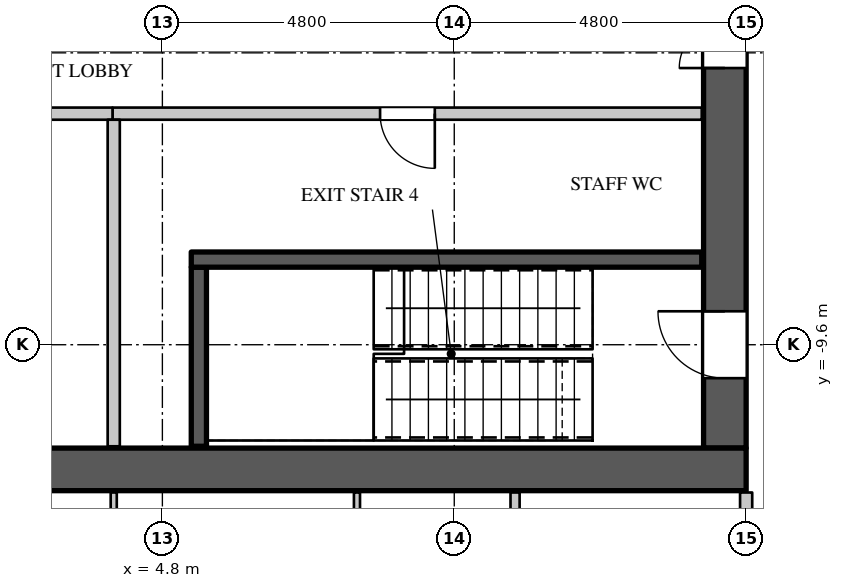
"""IFC4 building model, lengths in metres.
Left out: names, types, materials, properties, quantities, classifications, styles, units other than length and angle.
Written with IfcOpenShell. Run it as: python <this file> out.ifc"""

import sys

from ifc_helpers import new_model, si_unit, direction, frame, frame_2d, origin, place, context, subcontext, project, spatial, rectangle, extrude, element, fill, save


model = new_model("IFC4")
c1 = context("Model", 3, precision=1e-05, world=origin(), true_north=direction((0.0, 1.0)))
c2 = subcontext(c1, "Body", "Model", "MODEL_VIEW")
j1 = project(units=[si_unit("LENGTHUNIT", "METRE"), si_unit("PLANEANGLEUNIT", "RADIAN")], contexts=[c1])
p1 = place(None, origin())
s1 = spatial("IfcSite", under=j1, at=p1, CompositionType="ELEMENT")
p2 = place(p1, origin())
s2 = spatial("IfcBuilding", under=s1, at=p2, CompositionType="ELEMENT")
p3 = place(p2, frame((0.0, 0.0, 204.3)))
s3 = spatial("IfcBuildingStorey", under=s2, at=p3, CompositionType="ELEMENT", Elevation=204.3)
p4 = place(p3, frame((-14.4, -11.65, 0.0), z_axis=(0.0, 0.0, 1.0), x_axis=(1.0, 0.0, 0.0)))
e1 = element("IfcWall", 1, at=p4, inside=s3, PredefinedType="SHEAR", context=c2, shape_type="SweptSolid", body=[
    extrude(rectangle(XDim=28.8, YDim=0.7, at=frame_2d((14.4, 0.0))), origin(), (0.0, 0.0, 1.0), 4.2),
])
p5 = place(p3, frame((14.05, -11.3, 0.0), z_axis=(0.0, 0.0, 1.0), x_axis=(0.0, 1.0, 0.0)))
e2 = element("IfcWall", 2, at=p5, inside=s3, PredefinedType="SHEAR", context=c2, shape_type="SweptSolid", body=[
    extrude(rectangle(XDim=22.6, YDim=0.7, at=frame_2d((11.3, 0.0))), origin(), (0.0, 0.0, 1.0), 4.2),
])
p6 = place(p5, frame((20.35, 0.0, 0.0)))
e3 = element("IfcOpeningElement", 3, at=p6, cuts=e2, PredefinedType="OPENING", context=c2, shape_type="SweptSolid", body=[
    extrude(rectangle(XDim=1.1, YDim=2.2, at=frame_2d((0.55, 1.1))), frame((0.0, 0.36, 0.0), z_axis=(0.0, -1.0, 0.0), x_axis=(1.0, 0.0, 0.0)), (0.0, 0.0, 1.0), 0.72),
])
p7 = place(p5, frame((1.15, 0.0, 0.0)))
e4 = element("IfcOpeningElement", 4, at=p7, cuts=e2, PredefinedType="OPENING", context=c2, shape_type="SweptSolid", body=[
    extrude(rectangle(XDim=1.1, YDim=2.2, at=frame_2d((0.55, 1.1))), frame((0.0, 0.36, 0.0), z_axis=(0.0, -1.0, 0.0), x_axis=(1.0, 0.0, 0.0)), (0.0, 0.0, 1.0), 0.72),
])
p8 = place(p5, frame((14.85, 0.0, 0.0)))
e5 = element("IfcOpeningElement", 5, at=p8, cuts=e2, PredefinedType="OPENING", context=c2, shape_type="SweptSolid", body=[
    extrude(rectangle(XDim=1.5, YDim=2.4, at=frame_2d((0.75, 1.2))), frame((0.0, 0.36, 0.0), z_axis=(0.0, -1.0, 0.0), x_axis=(1.0, 0.0, 0.0)), (0.0, 0.0, 1.0), 0.72),
])
p9 = place(p5, frame((6.25, 0.0, 0.0)))
e6 = element("IfcOpeningElement", 6, at=p9, cuts=e2, PredefinedType="OPENING", context=c2, shape_type="SweptSolid", body=[
    extrude(rectangle(XDim=1.5, YDim=2.4, at=frame_2d((0.75, 1.2))), frame((0.0, 0.36, 0.0), z_axis=(0.0, -1.0, 0.0), x_axis=(1.0, 0.0, 0.0)), (0.0, 0.0, 1.0), 0.72),
])
p10 = place(p3, frame((3.98, -5.8, 0.0), z_axis=(0.0, 0.0, 1.0), x_axis=(1.0, 0.0, 0.0)))
e7 = element("IfcWall", 7, at=p10, inside=s3, PredefinedType="PARTITIONING", context=c2, shape_type="SweptSolid", body=[
    extrude(rectangle(XDim=9.69, YDim=0.2, at=frame_2d((4.845, 0.0))), origin(), (0.0, 0.0, 1.0), 3.798),
])
p11 = place(p10, frame((4.4, 0.0, 0.0)))
e8 = element("IfcOpeningElement", 8, at=p11, cuts=e7, PredefinedType="OPENING", context=c2, shape_type="SweptSolid", body=[
    extrude(rectangle(XDim=0.9, YDim=2.2, at=frame_2d((0.45, 1.1))), frame((0.0, 0.11, 0.0), z_axis=(0.0, -1.0, 0.0), x_axis=(1.0, 0.0, 0.0)), (0.0, 0.0, 1.0), 0.22),
])
p12 = place(p3, frame((14.4, -14.3, 0.0), z_axis=(0.0, 0.0, 1.0), x_axis=(0.0, 1.0, 0.0)))
e9 = element("IfcWall", 9, at=p12, inside=s3, PredefinedType="PARTITIONING", context=c2, shape_type="SweptSolid", body=[
    extrude(rectangle(XDim=2.27, YDim=0.2, at=frame_2d((1.135, 0.0))), origin(), (0.0, 0.0, 1.0), 3.798),
])
p13 = place(p12, frame((0.55, 0.0, 0.0)))
e10 = element("IfcOpeningElement", 10, at=p13, cuts=e9, PredefinedType="OPENING", context=c2, shape_type="SweptSolid", body=[
    extrude(rectangle(XDim=1.1, YDim=2.4, at=frame_2d((0.55, 1.2))), frame((0.0, 0.11, 0.0), z_axis=(0.0, -1.0, 0.0), x_axis=(1.0, 0.0, 0.0)), (0.0, 0.0, 1.0), 0.22),
])
p14 = place(p3, frame((10.6, -17.425, 0.0), z_axis=(0.0, 0.0, 1.0), x_axis=(0.0, 1.0, 0.0)))
e11 = element("IfcWall", 11, at=p14, inside=s3, PredefinedType="PARTITIONING", context=c2, shape_type="SweptSolid", body=[
    extrude(rectangle(XDim=5.395, YDim=0.15, at=frame_2d((2.698, 0.0))), origin(), (0.0, 0.0, 1.0), 3.798),
])
p15 = place(p14, frame((2.2, 0.0, 0.0)))
e12 = element("IfcOpeningElement", 12, at=p15, cuts=e11, PredefinedType="OPENING", context=c2, shape_type="SweptSolid", body=[
    extrude(rectangle(XDim=0.95, YDim=2.2, at=frame_2d((0.475, 1.1))), frame((0.0, 0.085, 0.0), z_axis=(0.0, -1.0, 0.0), x_axis=(1.0, 0.0, 0.0)), (0.0, 0.0, 1.0), 0.17),
])
p16 = place(p3, frame((-3.22, -5.8, 0.0), z_axis=(0.0, 0.0, 1.0), x_axis=(1.0, 0.0, 0.0)))
e13 = element("IfcWall", 13, at=p16, inside=s3, PredefinedType="PARTITIONING", context=c2, shape_type="SweptSolid", body=[
    extrude(rectangle(XDim=7.2, YDim=0.2, at=frame_2d((3.6, 0.0))), origin(), (0.0, 0.0, 1.0), 3.798),
])
p17 = place(p16, frame((3.15, 0.0, 0.0)))
e14 = element("IfcOpeningElement", 14, at=p17, cuts=e13, PredefinedType="OPENING", context=c2, shape_type="SweptSolid", body=[
    extrude(rectangle(XDim=0.9, YDim=2.2, at=frame_2d((0.45, 1.1))), frame((0.0, 0.11, 0.0), z_axis=(0.0, -1.0, 0.0), x_axis=(1.0, 0.0, 0.0)), (0.0, 0.0, 1.0), 0.22),
])
p18 = place(p3, frame((4.0, -11.27, 0.0), z_axis=(0.0, 0.0, 1.0), x_axis=(0.0, 1.0, 0.0)))
e15 = element("IfcWall", 15, at=p18, inside=s3, PredefinedType="PARTITIONING", context=c2, shape_type="SweptSolid", body=[
    extrude(rectangle(XDim=5.37, YDim=0.2, at=frame_2d((2.685, 0.0))), origin(), (0.0, 0.0, 1.0), 3.798),
])
p19 = place(p3, frame((5.4, -11.27, 0.0), z_axis=(0.0, 0.0, 1.0), x_axis=(0.0, 1.0, 0.0)))
e16 = element("IfcWall", 16, at=p19, inside=s3, PredefinedType="SHEAR", context=c2, shape_type="SweptSolid", body=[
    extrude(rectangle(XDim=2.945, YDim=0.25, at=frame_2d((1.473, 0.0))), origin(), (0.0, 0.0, 1.0), 3.798),
])
p20 = place(p3, frame((5.275, -8.2, 0.0), z_axis=(0.0, 0.0, 1.0), x_axis=(1.0, 0.0, 0.0)))
e17 = element("IfcWall", 17, at=p20, inside=s3, PredefinedType="SHEAR", context=c2, shape_type="SweptSolid", body=[
    extrude(rectangle(XDim=8.395, YDim=0.25, at=frame_2d((4.198, 0.0))), origin(), (0.0, 0.0, 1.0), 3.798),
])
p21 = place(p3, frame((4.0, -16.95, 0.0), z_axis=(0.0, 0.0, 1.0), x_axis=(0.0, 1.0, 0.0)))
e18 = element("IfcWall", 18, at=p21, inside=s3, PredefinedType="PARTITIONING", context=c2, shape_type="SweptSolid", body=[
    extrude(rectangle(XDim=4.92, YDim=0.1, at=frame_2d((2.46, 0.0))), origin(), (0.0, 0.0, 1.0), 3.2),
])
p22 = place(p3, frame((8.0, -16.925, 0.0), z_axis=(0.0, 0.0, 1.0), x_axis=(0.0, 1.0, 0.0)))
e19 = element("IfcWall", 19, at=p22, inside=s3, PredefinedType="PARTITIONING", context=c2, shape_type="SweptSolid", body=[
    extrude(rectangle(XDim=4.895, YDim=0.1, at=frame_2d((2.448, 0.0))), origin(), (0.0, 0.0, 1.0), 3.798),
])
p23 = place(p11, origin())
e20 = element("IfcDoor", 20, at=p23, inside=s3, OperationType="SINGLE_SWING_LEFT", PredefinedType="DOOR", context=c2, shape_type="SweptSolid", body=[
    extrude(rectangle(XDim=0.9, YDim=2.2, at=frame_2d((0.45, 1.1))), frame((0.0, 0.025, 0.0), z_axis=(0.0, -1.0, 0.0), x_axis=(1.0, 0.0, 0.0)), (0.0, 0.0, 1.0), 0.05),
])
fill(e8, e20)
p24 = place(p7, origin())
e21 = element("IfcDoor", 21, at=p24, inside=s3, OperationType="SINGLE_SWING_RIGHT", PredefinedType="DOOR", context=c2, shape_type="SweptSolid", body=[
    extrude(rectangle(XDim=1.1, YDim=2.2, at=frame_2d((0.55, 1.1))), frame((0.0, 0.345, 0.0), z_axis=(0.0, -1.0, 0.0), x_axis=(1.0, 0.0, 0.0)), (0.0, 0.0, 1.0), 0.05),
])
fill(e4, e21)
p25 = place(p9, origin())
e22 = element("IfcDoor", 22, at=p25, inside=s3, OperationType="DOUBLE_DOOR_SINGLE_SWING", PredefinedType="DOOR", context=c2, shape_type="SweptSolid", body=[
    extrude(rectangle(XDim=1.5, YDim=2.4, at=frame_2d((0.75, 1.2))), frame((0.0, 0.345, 0.0), z_axis=(0.0, -1.0, 0.0), x_axis=(1.0, 0.0, 0.0)), (0.0, 0.0, 1.0), 0.05),
])
fill(e6, e22)
save(model, sys.argv[1])
